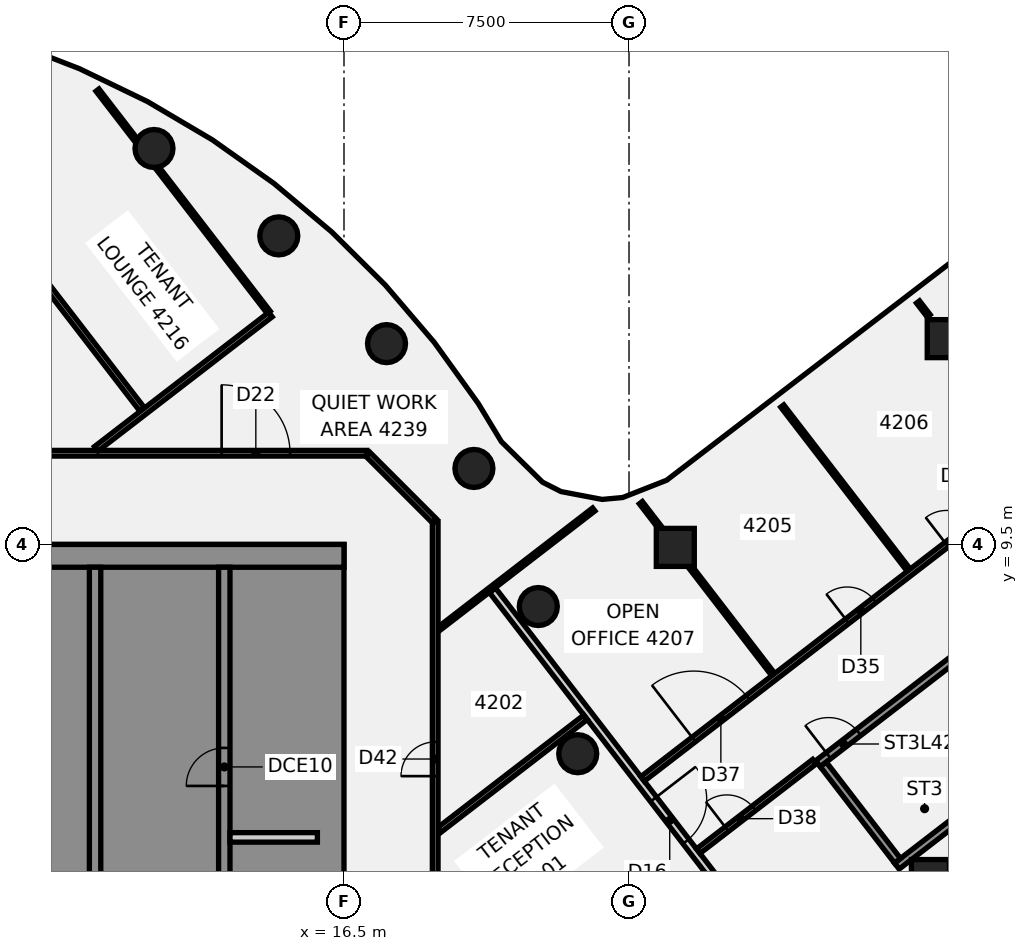
"""IFC4 building model, lengths in metres.
Left out: names, types, materials, properties, quantities, classifications, styles, units other than length and angle.
Written with IfcOpenShell. Run it as: python <this file> out.ifc"""

import sys

from ifc_helpers import new_model, si_unit, direction, frame, frame_2d, origin, origin_2d, place, context, subcontext, project, spatial, polyline, rectangle, circle, outline, extrude, element, fill, save


model = new_model("IFC4")
c1 = context("Model", 3, precision=1e-05, world=origin(), true_north=direction((0.0, 1.0)))
c2 = subcontext(c1, "Body", "Model", "MODEL_VIEW")
j1 = project(units=[si_unit("LENGTHUNIT", "METRE"), si_unit("PLANEANGLEUNIT", "RADIAN")], contexts=[c1])
p1 = place(None, origin())
s1 = spatial("IfcSite", under=j1, at=p1, CompositionType="ELEMENT")
p2 = place(p1, origin())
s2 = spatial("IfcBuilding", under=s1, at=p2, CompositionType="ELEMENT")
p3 = place(p2, frame((0.0, 0.0, 170.5)))
s3 = spatial("IfcBuildingStorey", under=s2, at=p3, CompositionType="ELEMENT", Elevation=170.5)
for number, where, z_axis, x_axis in (
    (1, (22.651, 3.994, -0.14), (0.0, 0.0, 1.0), (1.0, 0.0, 0.0)),
    (2, (21.613, 7.866, -0.14), (0.0, 0.0, 1.0), (1.0, 0.0, 0.0)),
    (3, (19.919, 11.5, -0.14), (0.0, 0.0, 1.0), (1.0, 0.0, 0.0)),
    (4, (17.619, 14.784, -0.14), (0.0, 0.0, 1.0), (1.0, 0.0, 0.0)),
    (5, (14.784, 17.619, -0.14), (0.0, 0.0, 1.0), (1.0, 0.0, 0.0)),
    (6, (11.5, 19.919, -0.14), (0.0, 0.0, 1.0), (1.0, 0.0, 0.0)),
):
    element("IfcColumn", number, at=place(p3, frame(where, z_axis=z_axis, x_axis=x_axis)), inside=s3, PredefinedType="COLUMN", context=c2, shape_type="SweptSolid", body=[
        extrude(circle(Radius=0.5, at=origin_2d()), origin(), (0.0, 0.0, 1.0), 3.75),
    ])
p4 = place(p3, frame((32.347, 14.916, -0.138), z_axis=(-0.072695791164, 0.049459100774, 0.996127059816), x_axis=(0.607260918781, -0.790097573591, 0.083546398652)))
e7 = element("IfcColumn", 7, at=p4, inside=s3, PredefinedType="COLUMN", context=c2, shape_type="SweptSolid", body=[
    extrude(rectangle(XDim=1.0, YDim=1.0, at=origin_2d()), origin(), (0.0, 0.0, 1.0), 3.761),
])
for number, where, z_axis, x_axis in (
    (8, (25.218, 9.423, -0.139), (-0.046, 0.015, 0.999), (0.61, -0.791, 0.04)),
    (9, (31.932, 0.709, -0.139), (-0.004, 0.048, 0.999), (-0.792, -0.61, 0.026)),
):
    element("IfcColumn", number, at=place(p3, frame(where, z_axis=z_axis, x_axis=x_axis)), inside=s3, PredefinedType="COLUMN", context=c2, shape_type="SweptSolid", body=[
        extrude(rectangle(XDim=1.0, YDim=1.0, at=origin_2d()), origin(), (0.0, 0.0, 1.0), 3.752),
    ])
p5 = place(p3, frame((4.001, 22.378, 0.0), z_axis=(0.0, 0.0, 1.0), x_axis=(0.610409788395, -0.792085784642, 0.0)))
e10 = element("IfcWall", 10, at=p5, inside=s3, PredefinedType="PARTITIONING", context=c2, shape_type="SweptSolid", body=[
    extrude(rectangle(XDim=11.777, YDim=0.15, at=frame_2d((5.889, 0.0))), origin(), (0.0, 0.0, 1.0), 3.01),
])
p6 = place(p5, frame((3.696, 0.0, 0.0)))
e11 = element("IfcOpeningElement", 11, at=p6, cuts=e10, PredefinedType="OPENING", context=c2, shape_type="SweptSolid", body=[
    extrude(rectangle(XDim=1.8, YDim=2.1, at=frame_2d((0.9, 1.05))), frame((0.0, 0.085, 0.0), z_axis=(0.0, -1.0, 0.0), x_axis=(1.0, 0.0, 0.0)), (0.0, 0.0, 1.0), 0.17),
])
p7 = place(p3, frame((10.013, 21.456, 0.0), z_axis=(0.0, 0.0, 1.0), x_axis=(0.610360453682, -0.792123801297, 0.0)))
e12 = element("IfcWall", 12, at=p7, inside=s3, PredefinedType="PARTITIONING", context=c2, shape_type="SweptSolid", body=[
    extrude(rectangle(XDim=1.688, YDim=0.1, at=frame_2d((0.844, 0.0))), origin(), (0.0, 0.0, 1.0), 3.01),
])
p8 = place(p3, frame((11.575, 19.429, 0.0), z_axis=(0.0, 0.0, 1.0), x_axis=(0.610346471548, -0.792134574848, 0.0)))
e13 = element("IfcWall", 13, at=p8, inside=s3, PredefinedType="PARTITIONING", context=c2, shape_type="SweptSolid", body=[
    extrude(rectangle(XDim=4.824, YDim=0.1, at=frame_2d((2.412, 0.0))), origin(), (0.0, 0.0, 1.0), 3.01),
])
p9 = place(p3, frame((20.409, 8.292, 0.0), z_axis=(0.0, 0.0, 1.0), x_axis=(0.610264945107, -0.792197384983, 0.0)))
e14 = element("IfcWall", 14, at=p9, inside=s3, PredefinedType="PARTITIONING", context=c2, shape_type="SweptSolid", body=[
    extrude(rectangle(XDim=14.239, YDim=0.2, at=frame_2d((7.12, 0.0))), origin(), (0.0, 0.0, 1.0), 3.01),
])
p10 = place(p9, frame((6.94, 0.0, 0.0)))
e15 = element("IfcOpeningElement", 15, at=p10, cuts=e14, PredefinedType="OPENING", context=c2, shape_type="SweptSolid", body=[
    extrude(rectangle(XDim=1.4, YDim=2.1, at=frame_2d((0.7, 1.05))), frame((0.0, 0.11, 0.0), z_axis=(0.0, -1.0, 0.0), x_axis=(1.0, 0.0, 0.0)), (0.0, 0.0, 1.0), 0.22),
])
p11 = place(p3, frame((24.311, 10.6, 0.0), z_axis=(0.0, 0.0, 1.0), x_axis=(0.610176870423, -0.792265225036, 0.0)))
e16 = element("IfcWall", 16, at=p11, inside=s3, PredefinedType="PARTITIONING", context=c2, shape_type="SweptSolid", body=[
    extrude(rectangle(XDim=0.81, YDim=0.1, at=frame_2d((0.405, 0.0))), origin(), (0.0, 0.0, 1.0), 3.01),
])
p12 = place(p3, frame((25.531, 9.017, 0.0), z_axis=(0.0, 0.0, 1.0), x_axis=(0.610209603324, -0.792240014144, 0.0)))
e17 = element("IfcWall", 17, at=p12, inside=s3, PredefinedType="PARTITIONING", context=c2, shape_type="SweptSolid", body=[
    extrude(rectangle(XDim=3.712, YDim=0.1, at=frame_2d((1.856, 0.0))), origin(), (0.0, 0.0, 1.0), 3.01),
])
p13 = place(p3, frame((28.032, 13.142, 0.0), z_axis=(0.0, 0.0, 1.0), x_axis=(0.610363930314, -0.792121122412, 0.0)))
e18 = element("IfcWall", 18, at=p13, inside=s3, PredefinedType="PARTITIONING", context=c2, shape_type="SweptSolid", body=[
    extrude(rectangle(XDim=5.453, YDim=0.1, at=frame_2d((2.727, 0.0))), origin(), (0.0, 0.0, 1.0), 3.01),
])
p14 = place(p3, frame((31.605, 15.88, 0.0), z_axis=(0.0, 0.0, 1.0), x_axis=(0.610327204222, -0.792149420114, 0.0)))
e19 = element("IfcWall", 19, at=p14, inside=s3, PredefinedType="PARTITIONING", context=c2, shape_type="SweptSolid", body=[
    extrude(rectangle(XDim=0.459, YDim=0.1, at=frame_2d((0.229, 0.0))), origin(), (0.0, 0.0, 1.0), 3.01),
])
p15 = place(p3, frame((17.128, 11.872, 0.0), z_axis=(0.0, 0.0, 1.0), x_axis=(0.707106781187, -0.707106781187, 0.0)))
e20 = element("IfcWall", 20, at=p15, inside=s3, PredefinedType="PARTITIONING", context=c2, shape_type="SweptSolid", body=[
    extrude(rectangle(XDim=2.465, YDim=0.15, at=frame_2d((1.232, 0.0))), origin(), (0.0, 0.0, 1.0), 3.01),
])
p16 = place(p3, frame((-17.065, 11.9, 0.0), z_axis=(0.0, 0.0, 1.0), x_axis=(1.0, 0.0, 0.0)))
e21 = element("IfcWall", 21, at=p16, inside=s3, PredefinedType="PARTITIONING", context=c2, shape_type="SweptSolid", body=[
    extrude(rectangle(XDim=34.165, YDim=0.15, at=frame_2d((17.083, 0.0))), origin(), (0.0, 0.0, 1.0), 3.01),
])
p17 = place(p16, frame((22.805, 0.0, 0.0)))
e22 = element("IfcOpeningElement", 22, at=p17, cuts=e21, PredefinedType="OPENING", context=c2, shape_type="SweptSolid", body=[
    extrude(rectangle(XDim=1.8, YDim=2.1, at=frame_2d((0.9, 1.05))), frame((0.0, 0.085, 0.0), z_axis=(0.0, -1.0, 0.0), x_axis=(1.0, 0.0, 0.0)), (0.0, 0.0, 1.0), 0.17),
])
p18 = place(p16, frame((30.345, 0.0, 0.0)))
e23 = element("IfcOpeningElement", 23, at=p18, cuts=e21, PredefinedType="OPENING", context=c2, shape_type="SweptSolid", body=[
    extrude(rectangle(XDim=1.8, YDim=2.1, at=frame_2d((0.9, 1.05))), frame((0.0, 0.085, 0.0), z_axis=(0.0, -1.0, 0.0), x_axis=(1.0, 0.0, 0.0)), (0.0, 0.0, 1.0), 0.17),
])
p19 = place(p16, frame((8.52, 0.0, 0.0)))
e24 = element("IfcOpeningElement", 24, at=p19, cuts=e21, PredefinedType="OPENING", context=c2, shape_type="SweptSolid", body=[
    extrude(rectangle(XDim=1.8, YDim=2.1, at=frame_2d((0.9, 1.05))), frame((0.0, 0.085, 0.0), z_axis=(0.0, -1.0, 0.0), x_axis=(1.0, 0.0, 0.0)), (0.0, 0.0, 1.0), 0.17),
])
p20 = place(p3, frame((9.98, 12.016, 0.0), z_axis=(0.0, 0.0, 1.0), x_axis=(0.792167406266, 0.610303859114, 0.0)))
e25 = element("IfcWall", 25, at=p20, inside=s3, PredefinedType="PARTITIONING", context=c2, shape_type="SweptSolid", body=[
    extrude(rectangle(XDim=5.787, YDim=0.15, at=frame_2d((2.894, 0.0))), origin(), (0.0, 0.0, 1.0), 3.01),
])
p21 = place(p3, frame((19.003, 1.983, 0.0), z_axis=(0.0, 0.0, 1.0), x_axis=(0.792144175523, 0.610334011165, 0.0)))
e26 = element("IfcWall", 26, at=p21, inside=s3, PredefinedType="PARTITIONING", context=c2, shape_type="SweptSolid", body=[
    extrude(rectangle(XDim=4.864, YDim=0.15, at=frame_2d((2.432, 0.0))), origin(), (0.0, 0.0, 1.0), 3.01),
])
p22 = place(p3, frame((18.987, 7.273, 0.0), z_axis=(0.0, 0.0, 1.0), x_axis=(0.792196145636, 0.610266553925, 0.0)))
e27 = element("IfcWall", 27, at=p22, inside=s3, PredefinedType="PARTITIONING", context=c2, shape_type="SweptSolid", body=[
    extrude(rectangle(XDim=5.157, YDim=0.1, at=frame_2d((2.579, 0.0))), origin(), (0.0, 0.0, 1.0), 3.01),
])
p23 = place(p3, frame((24.357, 3.331, 0.0), z_axis=(0.0, 0.0, 1.0), x_axis=(0.792166560138, 0.610304957378, 0.0)))
e28 = element("IfcWall", 28, at=p23, inside=s3, PredefinedType="PARTITIONING", context=c2, shape_type="SweptSolid", body=[
    extrude(rectangle(XDim=13.32, YDim=0.15, at=frame_2d((6.66, 0.0))), origin(), (0.0, 0.0, 1.0), 3.01),
])
p24 = place(p23, frame((6.799, 0.0, 0.0)))
e29 = element("IfcOpeningElement", 29, at=p24, cuts=e28, PredefinedType="OPENING", context=c2, shape_type="SweptSolid", body=[
    extrude(rectangle(XDim=0.9, YDim=2.1, at=frame_2d((0.45, 1.05))), frame((0.0, 0.085, 0.0), z_axis=(0.0, -1.0, 0.0), x_axis=(1.0, 0.0, 0.0)), (0.0, 0.0, 1.0), 0.17),
])
p25 = place(p23, frame((10.1, 0.0, 0.0)))
e30 = element("IfcOpeningElement", 30, at=p25, cuts=e28, PredefinedType="OPENING", context=c2, shape_type="SweptSolid", body=[
    extrude(rectangle(XDim=0.9, YDim=2.1, at=frame_2d((0.45, 1.05))), frame((0.0, 0.085, 0.0), z_axis=(0.0, -1.0, 0.0), x_axis=(1.0, 0.0, 0.0)), (0.0, 0.0, 1.0), 0.17),
])
p26 = place(p23, frame((1.7, 0.0, 0.0)))
e31 = element("IfcOpeningElement", 31, at=p26, cuts=e28, PredefinedType="OPENING", context=c2, shape_type="SweptSolid", body=[
    extrude(rectangle(XDim=1.8, YDim=2.1, at=frame_2d((0.9, 1.05))), frame((0.0, 0.085, 0.0), z_axis=(0.0, -1.0, 0.0), x_axis=(1.0, 0.0, 0.0)), (0.0, 0.0, 1.0), 0.17),
])
p27 = place(p3, frame((25.822, 1.43, 0.0), z_axis=(0.0, 0.0, 1.0), x_axis=(0.792113416719, 0.610373930516, 0.0)))
e32 = element("IfcWall", 32, at=p27, inside=s3, PredefinedType="PARTITIONING", context=c2, shape_type="SweptSolid", body=[
    extrude(rectangle(XDim=3.859, YDim=0.15, at=frame_2d((1.93, 0.0))), origin(), (0.0, 0.0, 1.0), 3.01),
])
p28 = place(p27, frame((0.95, 0.0, 0.0)))
e33 = element("IfcOpeningElement", 33, at=p28, cuts=e32, PredefinedType="OPENING", context=c2, shape_type="SweptSolid", body=[
    extrude(rectangle(XDim=0.9, YDim=2.1, at=frame_2d((0.45, 1.05))), frame((0.0, 0.085, 0.0), z_axis=(0.0, -1.0, 0.0), x_axis=(1.0, 0.0, 0.0)), (0.0, 0.0, 1.0), 0.17),
])
p29 = place(p3, frame((18.9, -10.1, 0.0), z_axis=(0.0, 0.0, 1.0), x_axis=(0.0, 1.0, 0.0)))
e34 = element("IfcWall", 34, at=p29, inside=s3, PredefinedType="PARTITIONING", context=c2, shape_type="SweptSolid", body=[
    extrude(rectangle(XDim=20.2, YDim=0.15, at=frame_2d((10.1, 0.0))), origin(), (0.0, 0.0, 1.0), 3.01),
])
p30 = place(p29, frame((7.769, 0.0, 0.0)))
e35 = element("IfcOpeningElement", 35, at=p30, cuts=e34, PredefinedType="OPENING", context=c2, shape_type="SweptSolid", body=[
    extrude(rectangle(XDim=1.8, YDim=2.1, at=frame_2d((0.9, 1.05))), frame((0.0, 0.085, 0.0), z_axis=(0.0, -1.0, 0.0), x_axis=(1.0, 0.0, 0.0)), (0.0, 0.0, 1.0), 0.17),
])
p31 = place(p29, frame((13.504, 0.0, 0.0)))
e36 = element("IfcOpeningElement", 36, at=p31, cuts=e34, PredefinedType="OPENING", context=c2, shape_type="SweptSolid", body=[
    extrude(rectangle(XDim=0.9, YDim=2.1, at=frame_2d((0.45, 1.05))), frame((0.0, 0.085, 0.0), z_axis=(0.0, -1.0, 0.0), x_axis=(1.0, 0.0, 0.0)), (0.0, 0.0, 1.0), 0.17),
])
p32 = place(p3, origin())
e37 = element("IfcWall", 37, at=p32, inside=s3, PredefinedType="SHEAR", context=c2, shape_type="SweptSolid", body=[
    extrude(outline(polyline([(13.5, -8.125), (13.5, -8.9), (15.9, -8.9), (16.5, -8.9), (16.5, 8.9), (15.9, 8.9), (13.5, 8.9), (13.5, 8.125), (15.9, 8.125), (15.9, 5.625), (13.5, 5.625), (13.5, 5.375), (15.9, 5.375), (15.9, -5.375), (13.5, -5.375), (13.5, -5.625), (15.9, -5.625), (15.9, -8.125), (13.5, -8.125)])), origin(), (0.0, 0.0, 1.0), 3.61),
])
p33 = place(p3, frame((16.5, 9.2, 0.0), z_axis=(0.0, 0.0, 1.0), x_axis=(-1.0, 0.0, 0.0)))
e38 = element("IfcWall", 38, at=p33, inside=s3, PredefinedType="SHEAR", context=c2, shape_type="SweptSolid", body=[
    extrude(rectangle(XDim=13.0, YDim=0.6, at=frame_2d((6.5, 0.0))), origin(), (0.0, 0.0, 1.0), 3.61),
])
p34 = place(p3, origin())
e39 = element("IfcWall", 39, at=p34, inside=s3, PredefinedType="SHEAR", context=c2, shape_type="SweptSolid", body=[
    extrude(outline(polyline([(9.8, -5.375), (7.5, -5.375), (7.5, -2.875), (9.8, -2.875), (9.8, -2.625), (7.5, -2.625), (7.5, -0.125), (9.8, -0.125), (9.8, 0.125), (7.5, 0.125), (7.5, 2.625), (9.8, 2.625), (9.8, 2.875), (7.5, 2.875), (7.5, 5.375), (9.8, 5.375), (9.8, 5.625), (7.5, 5.625), (7.5, 8.125), (9.8, 8.125), (9.8, 8.9), (7.5, 8.9), (7.2, 8.9), (7.2, -5.625), (7.5, -5.625), (9.8, -5.625), (9.8, -5.375)])), origin(), (0.0, 0.0, 1.0), 3.61),
])
p35 = place(p3, frame((13.35, -8.9, 0.0), z_axis=(0.0, 0.0, 1.0), x_axis=(0.0, 1.0, 0.0)))
e40 = element("IfcWall", 40, at=p35, inside=s3, PredefinedType="SHEAR", context=c2, shape_type="SweptSolid", body=[
    extrude(rectangle(XDim=17.8, YDim=0.3, at=frame_2d((8.9, 0.0))), origin(), (0.0, 0.0, 1.0), 3.61),
])
p36 = place(p35, frame((1.325, 0.0, 0.0)))
e41 = element("IfcOpeningElement", 41, at=p36, cuts=e40, PredefinedType="OPENING", context=c2, shape_type="SweptSolid", body=[
    extrude(rectangle(XDim=1.4, YDim=2.1, at=frame_2d((0.7, 1.05))), frame((0.0, 0.16, 0.0), z_axis=(0.0, -1.0, 0.0), x_axis=(1.0, 0.0, 0.0)), (0.0, 0.0, 1.0), 0.32),
])
p37 = place(p35, frame((6.546, 0.0, 0.0)))
e42 = element("IfcOpeningElement", 42, at=p37, cuts=e40, PredefinedType="OPENING", context=c2, shape_type="SweptSolid", body=[
    extrude(rectangle(XDim=1.0, YDim=2.1, at=frame_2d((0.5, 1.05))), frame((0.0, 0.16, 0.0), z_axis=(0.0, -1.0, 0.0), x_axis=(1.0, 0.0, 0.0)), (0.0, 0.0, 1.0), 0.32),
])
p38 = place(p35, frame((12.046, 0.0, 0.0)))
e43 = element("IfcOpeningElement", 43, at=p38, cuts=e40, PredefinedType="OPENING", context=c2, shape_type="SweptSolid", body=[
    extrude(rectangle(XDim=1.0, YDim=2.1, at=frame_2d((0.5, 1.05))), frame((0.0, 0.16, 0.0), z_axis=(0.0, -1.0, 0.0), x_axis=(1.0, 0.0, 0.0)), (0.0, 0.0, 1.0), 0.32),
])
p39 = place(p3, frame((9.95, -8.9, 0.0), z_axis=(0.0, 0.0, 1.0), x_axis=(0.0, 1.0, 0.0)))
e44 = element("IfcWall", 44, at=p39, inside=s3, PredefinedType="SHEAR", context=c2, shape_type="SweptSolid", body=[
    extrude(rectangle(XDim=17.8, YDim=0.3, at=frame_2d((8.9, 0.0))), origin(), (0.0, 0.0, 1.0), 3.61),
])
p40 = place(p39, frame((4.175, 0.0, 0.0)))
e45 = element("IfcOpeningElement", 45, at=p40, cuts=e44, PredefinedType="OPENING", context=c2, shape_type="SweptSolid", body=[
    extrude(rectangle(XDim=1.2, YDim=2.1, at=frame_2d((0.6, 1.05))), frame((0.0, 0.16, 0.0), z_axis=(0.0, -1.0, 0.0), x_axis=(1.0, 0.0, 0.0)), (0.0, 0.0, 1.0), 0.32),
])
p41 = place(p39, frame((6.925, 0.0, 0.0)))
e46 = element("IfcOpeningElement", 46, at=p41, cuts=e44, PredefinedType="OPENING", context=c2, shape_type="SweptSolid", body=[
    extrude(rectangle(XDim=1.2, YDim=2.1, at=frame_2d((0.6, 1.05))), frame((0.0, 0.16, 0.0), z_axis=(0.0, -1.0, 0.0), x_axis=(1.0, 0.0, 0.0)), (0.0, 0.0, 1.0), 0.32),
])
p42 = place(p3, frame((15.8, 1.792, 0.0), z_axis=(0.0, 0.0, 1.0), x_axis=(-1.0, 0.0, 0.0)))
e47 = element("IfcWall", 47, at=p42, inside=s3, PredefinedType="PARTITIONING", context=c2, shape_type="SweptSolid", body=[
    extrude(rectangle(XDim=2.3, YDim=0.25, at=frame_2d((1.15, 0.0))), origin(), (0.0, 0.0, 1.0), 3.61),
])
p43 = place(p3, frame((28.972, 3.731, -0.14), z_axis=(0.0, 0.0, 1.0), x_axis=(0.792153700274, 0.610321648921, 0.0)))
e48 = element("IfcWall", 48, at=p43, inside=s3, PredefinedType="SHEAR", context=c2, shape_type="SweptSolid", body=[
    extrude(rectangle(XDim=6.7, YDim=0.2, at=frame_2d((3.35, 0.0))), origin(), (0.0, 0.0, 1.0), 3.15),
])
p44 = place(p43, frame((0.35, 0.0, 0.0)))
e49 = element("IfcOpeningElement", 49, at=p44, cuts=e48, PredefinedType="OPENING", context=c2, shape_type="SweptSolid", body=[
    extrude(rectangle(XDim=1.0, YDim=2.1, at=frame_2d((0.5, 1.05))), frame((0.0, 0.11, 0.0), z_axis=(0.0, -1.0, 0.0), x_axis=(1.0, 0.0, 0.0)), (0.0, 0.0, 1.0), 0.22),
])
p45 = place(p3, frame((31.047, 1.037, -0.14), z_axis=(0.0, 0.0, 1.0), x_axis=(0.792136083086, 0.610344514085, 0.0)))
e50 = element("IfcWall", 50, at=p45, inside=s3, PredefinedType="SHEAR", context=c2, shape_type="SweptSolid", body=[
    extrude(rectangle(XDim=6.7, YDim=0.2, at=frame_2d((3.35, 0.0))), origin(), (0.0, 0.0, 1.0), 3.15),
])
p46 = place(p3, frame((31.065, 1.177, -0.14), z_axis=(0.0, 0.0, 1.0), x_axis=(-0.610289481398, 0.792178482979, 0.0)))
e51 = element("IfcWall", 51, at=p46, inside=s3, PredefinedType="SHEAR", context=c2, shape_type="SweptSolid", body=[
    extrude(rectangle(XDim=3.2, YDim=0.2, at=frame_2d((1.6, 0.0))), origin(), (0.0, 0.0, 1.0), 3.15),
])
p47 = place(p10, frame((1.4, 0.0, 0.0), z_axis=(0.0, 0.0, 1.0), x_axis=(-1.0, 0.0, 0.0)))
e52 = element("IfcDoor", 52, at=p47, inside=s3, OperationType="DOUBLE_DOOR_SINGLE_SWING", PredefinedType="DOOR", context=c2, shape_type="SweptSolid", body=[
    extrude(rectangle(XDim=1.4, YDim=2.1, at=frame_2d((0.7, 1.05))), frame((0.0, 0.025, 0.0), z_axis=(0.0, -1.0, 0.0), x_axis=(1.0, 0.0, 0.0)), (0.0, 0.0, 1.0), 0.05),
])
fill(e15, e52)
p48 = place(p18, origin())
e53 = element("IfcDoor", 53, at=p48, inside=s3, OperationType="DOUBLE_DOOR_SINGLE_SWING", PredefinedType="DOOR", context=c2, shape_type="SweptSolid", body=[
    extrude(rectangle(XDim=1.8, YDim=2.1, at=frame_2d((0.9, 1.05))), frame((0.0, 0.025, 0.0), z_axis=(0.0, -1.0, 0.0), x_axis=(1.0, 0.0, 0.0)), (0.0, 0.0, 1.0), 0.05),
])
fill(e23, e53)
p49 = place(p24, origin())
e54 = element("IfcDoor", 54, at=p49, inside=s3, OperationType="SINGLE_SWING_LEFT", PredefinedType="DOOR", context=c2, shape_type="SweptSolid", body=[
    extrude(rectangle(XDim=0.9, YDim=2.1, at=frame_2d((0.45, 1.05))), frame((0.0, 0.025, 0.0), z_axis=(0.0, -1.0, 0.0), x_axis=(1.0, 0.0, 0.0)), (0.0, 0.0, 1.0), 0.05),
])
fill(e29, e54)
p50 = place(p25, origin())
e55 = element("IfcDoor", 55, at=p50, inside=s3, OperationType="SINGLE_SWING_LEFT", PredefinedType="DOOR", context=c2, shape_type="SweptSolid", body=[
    extrude(rectangle(XDim=0.9, YDim=2.1, at=frame_2d((0.45, 1.05))), frame((0.0, 0.025, 0.0), z_axis=(0.0, -1.0, 0.0), x_axis=(1.0, 0.0, 0.0)), (0.0, 0.0, 1.0), 0.05),
])
fill(e30, e55)
p51 = place(p26, origin())
e56 = element("IfcDoor", 56, at=p51, inside=s3, OperationType="DOUBLE_DOOR_SINGLE_SWING", PredefinedType="DOOR", context=c2, shape_type="SweptSolid", body=[
    extrude(rectangle(XDim=1.8, YDim=2.1, at=frame_2d((0.9, 1.05))), frame((0.0, 0.025, 0.0), z_axis=(0.0, -1.0, 0.0), x_axis=(1.0, 0.0, 0.0)), (0.0, 0.0, 1.0), 0.05),
])
fill(e31, e56)
p52 = place(p28, frame((0.9, 0.0, 0.0), z_axis=(0.0, 0.0, 1.0), x_axis=(-1.0, 0.0, 0.0)))
e57 = element("IfcDoor", 57, at=p52, inside=s3, OperationType="SINGLE_SWING_LEFT", PredefinedType="DOOR", context=c2, shape_type="SweptSolid", body=[
    extrude(rectangle(XDim=0.9, YDim=2.1, at=frame_2d((0.45, 1.05))), frame((0.0, 0.025, 0.0), z_axis=(0.0, -1.0, 0.0), x_axis=(1.0, 0.0, 0.0)), (0.0, 0.0, 1.0), 0.05),
])
fill(e33, e57)
p53 = place(p31, frame((0.9, 0.0, 0.0), z_axis=(0.0, 0.0, 1.0), x_axis=(-1.0, 0.0, 0.0)))
e58 = element("IfcDoor", 58, at=p53, inside=s3, OperationType="SINGLE_SWING_RIGHT", PredefinedType="DOOR", context=c2, shape_type="SweptSolid", body=[
    extrude(rectangle(XDim=0.9, YDim=2.1, at=frame_2d((0.45, 1.05))), frame((0.0, 0.025, 0.0), z_axis=(0.0, -1.0, 0.0), x_axis=(1.0, 0.0, 0.0)), (0.0, 0.0, 1.0), 0.05),
])
fill(e36, e58)
p54 = place(p38, origin())
e59 = element("IfcDoor", 59, at=p54, inside=s3, OperationType="SINGLE_SWING_LEFT", PredefinedType="DOOR", context=c2, shape_type="SweptSolid", body=[
    extrude(rectangle(XDim=1.0, YDim=2.1, at=frame_2d((0.5, 1.05))), frame((0.0, 0.025, 0.0), z_axis=(0.0, -1.0, 0.0), x_axis=(1.0, 0.0, 0.0)), (0.0, 0.0, 1.0), 0.05),
])
fill(e43, e59)
p55 = place(p44, origin())
e60 = element("IfcDoor", 60, at=p55, inside=s3, OperationType="SINGLE_SWING_LEFT", PredefinedType="DOOR", context=c2, shape_type="SweptSolid", body=[
    extrude(rectangle(XDim=1.0, YDim=2.1, at=frame_2d((0.5, 1.05))), frame((0.0, 0.025, 0.0), z_axis=(0.0, -1.0, 0.0), x_axis=(1.0, 0.0, 0.0)), (0.0, 0.0, 1.0), 0.05),
])
fill(e49, e60)
save(model, sys.argv[1])
